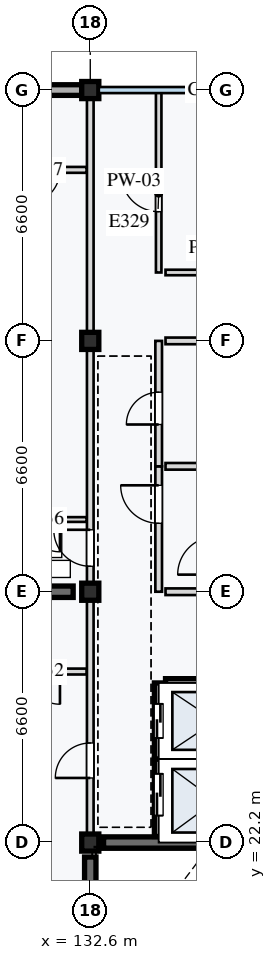
"""IFC4 building model, lengths in metres.
Left out: names, types, materials, properties, quantities, classifications, styles, units other than length and angle.
Written with IfcOpenShell. Run it as: python <this file> out.ifc"""

import sys

from ifc_helpers import new_model, si_unit, direction, frame, frame_2d, origin, origin_2d, place, context, subcontext, project, spatial, rectangle, extrude, element, fill, save


model = new_model("IFC4")
c1 = context("Model", 3, precision=1e-05, world=origin(), true_north=direction((0.0, 1.0)))
c2 = subcontext(c1, "Body", "Model", "MODEL_VIEW")
j1 = project(units=[si_unit("LENGTHUNIT", "METRE"), si_unit("PLANEANGLEUNIT", "RADIAN")], contexts=[c1])
p1 = place(None, origin())
s1 = spatial("IfcSite", under=j1, at=p1, CompositionType="ELEMENT")
p2 = place(p1, origin())
s2 = spatial("IfcBuilding", under=s1, at=p2, CompositionType="ELEMENT")
p3 = place(p2, frame((0.0, 0.0, 27.6)))
s3 = spatial("IfcBuildingStorey", under=s2, at=p3, CompositionType="ELEMENT", Elevation=27.6)
for number, where, z_axis, x_axis in (
    (1, (132.6, 22.2, 0.0), (0.0, 0.0, 1.0), (1.0, 0.0, 0.0)),
    (2, (132.6, 28.8, 0.0), (0.0, 0.0, 1.0), (1.0, 0.0, 0.0)),
    (3, (132.6, 35.4, 0.0), (0.0, 0.0, 1.0), (1.0, 0.0, 0.0)),
    (4, (132.6, 42.0, 0.0), (0.0, 0.0, 1.0), (1.0, 0.0, 0.0)),
):
    element("IfcColumn", number, at=place(p3, frame(where, z_axis=z_axis, x_axis=x_axis)), inside=s3, PredefinedType="COLUMN", context=c2, shape_type="SweptSolid", body=[
        extrude(rectangle(XDim=0.45, YDim=0.45, at=origin_2d()), origin(), (0.0, 0.0, 1.0), 3.2),
    ])
p4 = place(p3, frame((132.6, 15.98, 0.0), z_axis=(0.0, 0.0, 1.0), x_axis=(0.0, 1.0, 0.0)))
e5 = element("IfcWall", 5, at=p4, inside=s3, PredefinedType="SHEAR", context=c2, shape_type="SweptSolid", body=[
    extrude(rectangle(XDim=5.84, YDim=0.3, at=frame_2d((2.92, 0.0))), origin(), (0.0, 0.0, 1.0), 2.97),
])
p5 = place(p3, frame((132.95, 22.2, 0.0), z_axis=(0.0, 0.0, 1.0), x_axis=(1.0, 0.0, 0.0)))
e6 = element("IfcWall", 6, at=p5, inside=s3, PredefinedType="SHEAR", context=c2, shape_type="SweptSolid", body=[
    extrude(rectangle(XDim=2.8, YDim=0.3, at=frame_2d((1.4, 0.0))), origin(), (0.0, 0.0, 1.0), 2.97),
])
p6 = place(p3, frame((126.45, 28.8, 0.0), z_axis=(0.0, 0.0, 1.0), x_axis=(1.0, 0.0, 0.0)))
e7 = element("IfcWall", 7, at=p6, inside=s3, PredefinedType="SHEAR", context=c2, shape_type="SweptSolid", body=[
    extrude(rectangle(XDim=5.7, YDim=0.3, at=frame_2d((2.85, 0.0))), origin(), (0.0, 0.0, 1.0), 2.97),
])
p7 = place(p3, frame((126.225, 42.0, 0.0), z_axis=(0.0, 0.0, 1.0), x_axis=(1.0, 0.0, 0.0)))
e8 = element("IfcWall", 8, at=p7, inside=s3, PredefinedType="STANDARD", context=c2, shape_type="SweptSolid", body=[
    extrude(rectangle(XDim=6.15, YDim=0.28, at=frame_2d((3.075, 0.0))), origin(), (0.0, 0.0, 1.0), 2.65),
])
p8 = place(p3, frame((134.4, 22.36, 0.0), z_axis=(0.0, 0.0, 1.0), x_axis=(0.0, 1.0, 0.0)))
e9 = element("IfcWall", 9, at=p8, inside=s3, PredefinedType="STANDARD", context=c2, shape_type="SweptSolid", body=[
    extrude(rectangle(XDim=2.04, YDim=0.225, at=frame_2d((1.02, 0.0))), origin(), (0.0, 0.0, 1.0), 2.97),
])
p9 = place(p8, frame((0.55, 0.0, 0.0)))
e10 = element("IfcOpeningElement", 10, at=p9, cuts=e9, PredefinedType="OPENING", context=c2, shape_type="SweptSolid", body=[
    extrude(rectangle(XDim=1.1, YDim=2.1, at=frame_2d((0.55, 1.05))), frame((0.0, 0.123, 0.0), z_axis=(0.0, -1.0, 0.0), x_axis=(1.0, 0.0, 0.0)), (0.0, 0.0, 1.0), 0.245),
])
p10 = place(p3, frame((134.4, 24.4, 0.0), z_axis=(0.0, 0.0, 1.0), x_axis=(0.0, 1.0, 0.0)))
e11 = element("IfcWall", 11, at=p10, inside=s3, PredefinedType="STANDARD", context=c2, shape_type="SweptSolid", body=[
    extrude(rectangle(XDim=2.0, YDim=0.225, at=frame_2d((1.0, 0.0))), origin(), (0.0, 0.0, 1.0), 2.97),
])
p11 = place(p10, frame((0.55, 0.0, 0.0)))
e12 = element("IfcOpeningElement", 12, at=p11, cuts=e11, PredefinedType="OPENING", context=c2, shape_type="SweptSolid", body=[
    extrude(rectangle(XDim=0.9, YDim=2.1, at=frame_2d((0.45, 1.05))), frame((0.0, 0.123, 0.0), z_axis=(0.0, -1.0, 0.0), x_axis=(1.0, 0.0, 0.0)), (0.0, 0.0, 1.0), 0.245),
])
for number, where, z_axis, x_axis in (
    (13, (134.58, 24.4, 0.0), (0.0, 0.0, 1.0), (1.0, 0.0, 0.0)),
    (14, (134.58, 26.4, 0.0), (0.0, 0.0, 1.0), (1.0, 0.0, 0.0)),
):
    element("IfcWall", number, at=place(p3, frame(where, z_axis=z_axis, x_axis=x_axis)), inside=s3, PredefinedType="STANDARD", context=c2, shape_type="SweptSolid", body=[
        extrude(rectangle(XDim=2.64, YDim=0.225, at=frame_2d((1.32, 0.0))), origin(), (0.0, 0.0, 1.0), 2.97),
    ])
p12 = place(p3, frame((134.4, 28.8, 0.0), z_axis=(0.0, 0.0, 1.0), x_axis=(0.0, 1.0, 0.0)))
e15 = element("IfcWall", 15, at=p12, inside=s3, PredefinedType="PARTITIONING", context=c2, shape_type="SweptSolid", body=[
    extrude(rectangle(XDim=3.3, YDim=0.175, at=frame_2d((1.65, 0.0))), origin(), (0.0, 0.0, 1.0), 2.97),
])
p13 = place(p12, frame((1.8, 0.0, 0.0)))
e16 = element("IfcOpeningElement", 16, at=p13, cuts=e15, PredefinedType="OPENING", context=c2, shape_type="SweptSolid", body=[
    extrude(rectangle(XDim=1.0, YDim=2.16, at=frame_2d((0.5, 1.08))), frame((0.0, 0.097, 0.0), z_axis=(0.0, -1.0, 0.0), x_axis=(1.0, 0.0, 0.0)), (0.0, 0.0, 1.0), 0.195),
])
p14 = place(p3, frame((134.4, 32.1, 0.0), z_axis=(0.0, 0.0, 1.0), x_axis=(0.0, 1.0, 0.0)))
e17 = element("IfcWall", 17, at=p14, inside=s3, PredefinedType="PARTITIONING", context=c2, shape_type="SweptSolid", body=[
    extrude(rectangle(XDim=3.3, YDim=0.175, at=frame_2d((1.65, 0.0))), origin(), (0.0, 0.0, 1.0), 2.97),
])
p15 = place(p14, frame((1.1, 0.0, 0.0)))
e18 = element("IfcOpeningElement", 18, at=p15, cuts=e17, PredefinedType="OPENING", context=c2, shape_type="SweptSolid", body=[
    extrude(rectangle(XDim=0.85, YDim=2.0, at=frame_2d((0.425, 1.0))), frame((0.0, 0.097, 0.0), z_axis=(0.0, -1.0, 0.0), x_axis=(1.0, 0.0, 0.0)), (0.0, 0.0, 1.0), 0.195),
])
for number, where, z_axis, x_axis in (
    (19, (134.58, 28.8, 0.0), (0.0, 0.0, 1.0), (1.0, 0.0, 0.0)),
    (20, (134.58, 32.1, 0.0), (0.0, 0.0, 1.0), (1.0, 0.0, 0.0)),
    (21, (134.58, 35.4, 0.0), (0.0, 0.0, 1.0), (1.0, 0.0, 0.0)),
):
    element("IfcWall", number, at=place(p3, frame(where, z_axis=z_axis, x_axis=x_axis)), inside=s3, PredefinedType="PARTITIONING", context=c2, shape_type="SweptSolid", body=[
        extrude(rectangle(XDim=1.14, YDim=0.175, at=frame_2d((0.57, 0.0))), origin(), (0.0, 0.0, 1.0), 2.97),
    ])
p16 = place(p3, frame((134.4, 37.2, 0.0), z_axis=(0.0, 0.0, 1.0), x_axis=(0.0, 1.0, 0.0)))
e22 = element("IfcWall", 22, at=p16, inside=s3, PredefinedType="PARTITIONING", context=c2, shape_type="SweptSolid", body=[
    extrude(rectangle(XDim=4.8, YDim=0.145, at=frame_2d((2.4, 0.0))), origin(), (0.0, 0.0, 1.0), 2.97),
])
p17 = place(p16, frame((1.6, 0.0, 0.0)))
e23 = element("IfcOpeningElement", 23, at=p17, cuts=e22, PredefinedType="OPENING", context=c2, shape_type="SweptSolid", body=[
    extrude(rectangle(XDim=0.98, YDim=2.12, at=frame_2d((0.49, 1.06))), frame((0.0, 0.083, 0.0), z_axis=(0.0, -1.0, 0.0), x_axis=(1.0, 0.0, 0.0)), (0.0, 0.0, 1.0), 0.165),
])
p18 = place(p3, frame((134.58, 37.2, 0.0), z_axis=(0.0, 0.0, 1.0), x_axis=(1.0, 0.0, 0.0)))
e24 = element("IfcWall", 24, at=p18, inside=s3, PredefinedType="PARTITIONING", context=c2, shape_type="SweptSolid", body=[
    extrude(rectangle(XDim=2.64, YDim=0.145, at=frame_2d((1.32, 0.0))), origin(), (0.0, 0.0, 1.0), 2.97),
])
p19 = place(p3, frame((132.6, 22.2, 0.0), z_axis=(0.0, 0.0, 1.0), x_axis=(0.0, 1.0, 0.0)))
e25 = element("IfcWall", 25, at=p19, inside=s3, PredefinedType="PARTITIONING", context=c2, shape_type="SweptSolid", body=[
    extrude(rectangle(XDim=6.6, YDim=0.175, at=frame_2d((3.3, 0.0))), origin(), (0.0, 0.0, 1.0), 2.55),
])
p20 = place(p19, frame((1.7, 0.0, 0.0)))
e26 = element("IfcOpeningElement", 26, at=p20, cuts=e25, PredefinedType="OPENING", context=c2, shape_type="SweptSolid", body=[
    extrude(rectangle(XDim=0.92, YDim=2.14, at=frame_2d((0.46, 1.07))), frame((0.0, 0.097, 0.0), z_axis=(0.0, -1.0, 0.0), x_axis=(1.0, 0.0, 0.0)), (0.0, 0.0, 1.0), 0.195),
])
p21 = place(p3, frame((132.502, 26.7, 0.0), z_axis=(0.0, 0.0, 1.0), x_axis=(-1.0, 0.0, 0.0)))
e27 = element("IfcWall", 27, at=p21, inside=s3, PredefinedType="PARTITIONING", context=c2, shape_type="SweptSolid", body=[
    extrude(rectangle(XDim=2.302, YDim=0.155, at=frame_2d((1.151, 0.0))), origin(), (0.0, 0.0, 1.0), 2.97),
])
p22 = place(p21, frame((0.7, 0.0, 0.0)))
e28 = element("IfcOpeningElement", 28, at=p22, cuts=e27, PredefinedType="OPENING", context=c2, shape_type="SweptSolid", body=[
    extrude(rectangle(XDim=0.86, YDim=2.12, at=frame_2d((0.43, 1.06))), frame((0.0, 0.087, 0.0), z_axis=(0.0, -1.0, 0.0), x_axis=(1.0, 0.0, 0.0)), (0.0, 0.0, 1.0), 0.175),
])
p23 = place(p3, frame((132.6, 28.8, 0.0), z_axis=(0.0, 0.0, 1.0), x_axis=(0.0, 1.0, 0.0)))
e29 = element("IfcWall", 29, at=p23, inside=s3, PredefinedType="PARTITIONING", context=c2, shape_type="SweptSolid", body=[
    extrude(rectangle(XDim=13.2, YDim=0.175, at=frame_2d((6.6, 0.0))), origin(), (0.0, 0.0, 1.0), 2.55),
])
p24 = place(p23, frame((0.67, 0.0, 0.0)))
e30 = element("IfcOpeningElement", 30, at=p24, cuts=e29, PredefinedType="OPENING", context=c2, shape_type="SweptSolid", body=[
    extrude(rectangle(XDim=0.96, YDim=2.18, at=frame_2d((0.48, 1.09))), frame((0.0, 0.097, 0.0), z_axis=(0.0, -1.0, 0.0), x_axis=(1.0, 0.0, 0.0)), (0.0, 0.0, 1.0), 0.195),
])
p25 = place(p3, frame((132.502, 30.7, 0.0), z_axis=(0.0, 0.0, 1.0), x_axis=(-1.0, 0.0, 0.0)))
e31 = element("IfcWall", 31, at=p25, inside=s3, PredefinedType="PARTITIONING", context=c2, shape_type="SweptSolid", body=[
    extrude(rectangle(XDim=2.302, YDim=0.125, at=frame_2d((1.151, 0.0))), origin(), (0.0, 0.0, 1.0), 2.97),
])
p26 = place(p25, frame((0.7, 0.0, 0.0)))
e32 = element("IfcOpeningElement", 32, at=p26, cuts=e31, PredefinedType="OPENING", context=c2, shape_type="SweptSolid", body=[
    extrude(rectangle(XDim=0.85, YDim=2.04, at=frame_2d((0.425, 1.02))), frame((0.0, 0.073, 0.0), z_axis=(0.0, -1.0, 0.0), x_axis=(1.0, 0.0, 0.0)), (0.0, 0.0, 1.0), 0.145),
])
p27 = place(p3, frame((132.502, 39.9, 0.0), z_axis=(0.0, 0.0, 1.0), x_axis=(-1.0, 0.0, 0.0)))
e33 = element("IfcWall", 33, at=p27, inside=s3, PredefinedType="PARTITIONING", context=c2, shape_type="SweptSolid", body=[
    extrude(rectangle(XDim=2.302, YDim=0.155, at=frame_2d((1.151, 0.0))), origin(), (0.0, 0.0, 1.0), 2.97),
])
p28 = place(p27, frame((0.7, 0.0, 0.0)))
e34 = element("IfcOpeningElement", 34, at=p28, cuts=e33, PredefinedType="OPENING", context=c2, shape_type="SweptSolid", body=[
    extrude(rectangle(XDim=0.9, YDim=2.16, at=frame_2d((0.45, 1.08))), frame((0.0, 0.087, 0.0), z_axis=(0.0, -1.0, 0.0), x_axis=(1.0, 0.0, 0.0)), (0.0, 0.0, 1.0), 0.175),
])
p29 = place(p9, origin())
e35 = element("IfcDoor", 35, at=p29, inside=s3, OperationType="DOUBLE_DOOR_SLIDING", PredefinedType="DOOR", context=c2, shape_type="SweptSolid", body=[
    extrude(rectangle(XDim=1.1, YDim=2.1, at=frame_2d((0.55, 1.05))), frame((0.0, 0.025, 0.0), z_axis=(0.0, -1.0, 0.0), x_axis=(1.0, 0.0, 0.0)), (0.0, 0.0, 1.0), 0.05),
])
fill(e10, e35)
p30 = place(p11, origin())
e36 = element("IfcDoor", 36, at=p30, inside=s3, OperationType="DOUBLE_DOOR_SLIDING", PredefinedType="DOOR", context=c2, shape_type="SweptSolid", body=[
    extrude(rectangle(XDim=0.9, YDim=2.1, at=frame_2d((0.45, 1.05))), frame((0.0, 0.025, 0.0), z_axis=(0.0, -1.0, 0.0), x_axis=(1.0, 0.0, 0.0)), (0.0, 0.0, 1.0), 0.05),
])
fill(e12, e36)
p31 = place(p13, origin())
e37 = element("IfcDoor", 37, at=p31, inside=s3, OperationType="SINGLE_SWING_RIGHT", PredefinedType="DOOR", context=c2, shape_type="SweptSolid", body=[
    extrude(rectangle(XDim=1.0, YDim=2.16, at=frame_2d((0.5, 1.08))), frame((0.0, 0.025, 0.0), z_axis=(0.0, -1.0, 0.0), x_axis=(1.0, 0.0, 0.0)), (0.0, 0.0, 1.0), 0.05),
])
fill(e16, e37)
p32 = place(p15, origin())
e38 = element("IfcDoor", 38, at=p32, inside=s3, OperationType="SINGLE_SWING_LEFT", PredefinedType="DOOR", context=c2, shape_type="SweptSolid", body=[
    extrude(rectangle(XDim=0.85, YDim=2.0, at=frame_2d((0.425, 1.0))), frame((0.0, 0.025, 0.0), z_axis=(0.0, -1.0, 0.0), x_axis=(1.0, 0.0, 0.0)), (0.0, 0.0, 1.0), 0.05),
])
fill(e18, e38)
p33 = place(p17, origin())
e39 = element("IfcDoor", 39, at=p33, inside=s3, OperationType="SINGLE_SWING_RIGHT", PredefinedType="DOOR", context=c2, shape_type="SweptSolid", body=[
    extrude(rectangle(XDim=0.98, YDim=2.12, at=frame_2d((0.49, 1.06))), frame((0.0, 0.025, 0.0), z_axis=(0.0, -1.0, 0.0), x_axis=(1.0, 0.0, 0.0)), (0.0, 0.0, 1.0), 0.05),
])
fill(e23, e39)
p34 = place(p20, origin())
e40 = element("IfcDoor", 40, at=p34, inside=s3, OperationType="SINGLE_SWING_LEFT", PredefinedType="DOOR", context=c2, shape_type="SweptSolid", body=[
    extrude(rectangle(XDim=0.92, YDim=2.14, at=frame_2d((0.46, 1.07))), frame((0.0, 0.025, 0.0), z_axis=(0.0, -1.0, 0.0), x_axis=(1.0, 0.0, 0.0)), (0.0, 0.0, 1.0), 0.05),
])
fill(e26, e40)
p35 = place(p22, origin())
e41 = element("IfcDoor", 41, at=p35, inside=s3, OperationType="SINGLE_SWING_LEFT", PredefinedType="DOOR", context=c2, shape_type="SweptSolid", body=[
    extrude(rectangle(XDim=0.86, YDim=2.12, at=frame_2d((0.43, 1.06))), frame((0.0, 0.025, 0.0), z_axis=(0.0, -1.0, 0.0), x_axis=(1.0, 0.0, 0.0)), (0.0, 0.0, 1.0), 0.05),
])
fill(e28, e41)
p36 = place(p24, origin())
e42 = element("IfcDoor", 42, at=p36, inside=s3, OperationType="SINGLE_SWING_RIGHT", PredefinedType="DOOR", context=c2, shape_type="SweptSolid", body=[
    extrude(rectangle(XDim=0.96, YDim=2.18, at=frame_2d((0.48, 1.09))), frame((0.0, 0.025, 0.0), z_axis=(0.0, -1.0, 0.0), x_axis=(1.0, 0.0, 0.0)), (0.0, 0.0, 1.0), 0.05),
])
fill(e30, e42)
p37 = place(p26, origin())
e43 = element("IfcDoor", 43, at=p37, inside=s3, OperationType="SINGLE_SWING_LEFT", PredefinedType="DOOR", context=c2, shape_type="SweptSolid", body=[
    extrude(rectangle(XDim=0.85, YDim=2.04, at=frame_2d((0.425, 1.02))), frame((0.0, 0.025, 0.0), z_axis=(0.0, -1.0, 0.0), x_axis=(1.0, 0.0, 0.0)), (0.0, 0.0, 1.0), 0.05),
])
fill(e32, e43)
p38 = place(p28, origin())
e44 = element("IfcDoor", 44, at=p38, inside=s3, OperationType="SINGLE_SWING_RIGHT", PredefinedType="DOOR", context=c2, shape_type="SweptSolid", body=[
    extrude(rectangle(XDim=0.9, YDim=2.16, at=frame_2d((0.45, 1.08))), frame((0.0, 0.025, 0.0), z_axis=(0.0, -1.0, 0.0), x_axis=(1.0, 0.0, 0.0)), (0.0, 0.0, 1.0), 0.05),
])
fill(e34, e44)
save(model, sys.argv[1])
